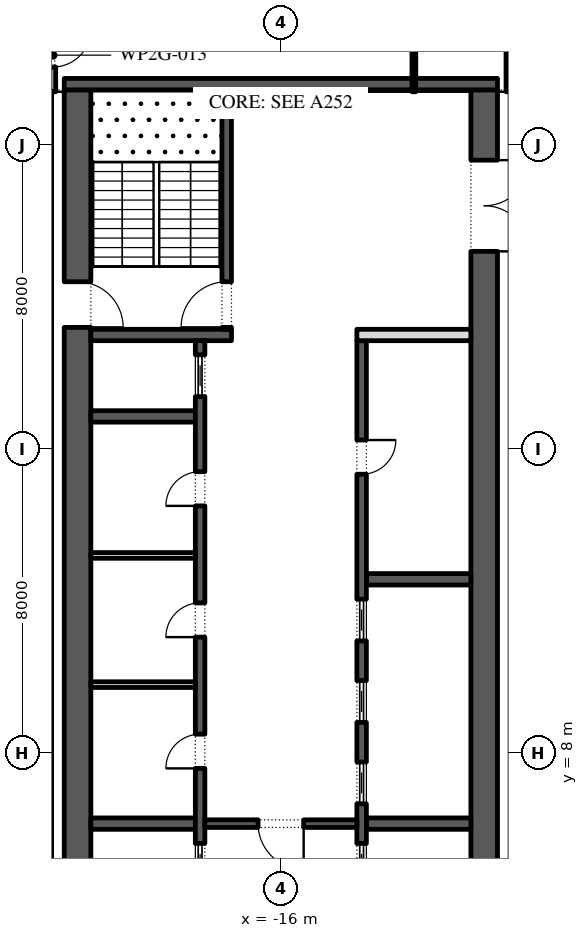
"""IFC4 building model, lengths in metres.
Left out: names, types, materials, properties, quantities, classifications, styles, units other than length and angle.
Written with IfcOpenShell. Run it as: python <this file> out.ifc"""

import sys

from ifc_helpers import new_model, si_unit, direction, frame, frame_2d, origin, place, context, subcontext, project, spatial, rectangle, extrude, element, fill, save


model = new_model("IFC4")
c1 = context("Model", 3, precision=1e-05, world=origin(), true_north=direction((0.0, 1.0)))
c2 = subcontext(c1, "Body", "Model", "MODEL_VIEW")
j1 = project(units=[si_unit("LENGTHUNIT", "METRE"), si_unit("PLANEANGLEUNIT", "RADIAN")], contexts=[c1])
p1 = place(None, origin())
s1 = spatial("IfcSite", under=j1, at=p1, CompositionType="ELEMENT")
p2 = place(p1, origin())
s2 = spatial("IfcBuilding", under=s1, at=p2, CompositionType="ELEMENT")
p3 = place(p2, frame((0.0, 0.0, 222.0)))
s3 = spatial("IfcBuildingStorey", under=s2, at=p3, CompositionType="ELEMENT", Elevation=222.0)
p4 = place(p3, frame((-33.157, 30.092, 0.0), z_axis=(0.0, 0.0, 1.0), x_axis=(0.224950279389, -0.974370243697, 0.0)))
e1 = element("IfcWall", 1, at=p4, inside=s3, PredefinedType="STANDARD", context=c2, shape_type="SweptSolid", body=[
    extrude(rectangle(XDim=49.5, YDim=0.3, at=frame_2d((24.75, 0.0))), origin(), (0.0, 0.0, 1.0), 3.75),
])
p5 = place(p4, frame((2.207, 0.0, 0.0)))
e2 = element("IfcOpeningElement", 2, at=p5, cuts=e1, PredefinedType="OPENING", context=c2, shape_type="SweptSolid", body=[
    extrude(rectangle(XDim=2.4, YDim=3.5, at=frame_2d((1.2, 1.75))), frame((0.0, 0.16, 0.0), z_axis=(0.0, -1.0, 0.0), x_axis=(1.0, 0.0, 0.0)), (0.0, 0.0, 1.0), 0.32),
])
p6 = place(p4, frame((7.871, 0.0, 0.45)))
e3 = element("IfcOpeningElement", 3, at=p6, cuts=e1, PredefinedType="OPENING", context=c2, shape_type="SweptSolid", body=[
    extrude(rectangle(XDim=5.0, YDim=2.575, at=frame_2d((2.5, 1.288))), frame((0.0, 0.16, 0.0), z_axis=(0.0, -1.0, 0.0), x_axis=(1.0, 0.0, 0.0)), (0.0, 0.0, 1.0), 0.32),
])
p7 = place(p4, frame((14.986, 0.0, 0.45)))
e4 = element("IfcOpeningElement", 4, at=p7, cuts=e1, PredefinedType="OPENING", context=c2, shape_type="SweptSolid", body=[
    extrude(rectangle(XDim=5.0, YDim=3.25, at=frame_2d((2.5, 1.625))), frame((0.0, 0.16, 0.0), z_axis=(0.0, -1.0, 0.0), x_axis=(1.0, 0.0, 0.0)), (0.0, 0.0, 1.0), 0.32),
])
p8 = place(p4, frame((22.1, 0.0, 0.45)))
e5 = element("IfcOpeningElement", 5, at=p8, cuts=e1, PredefinedType="OPENING", context=c2, shape_type="SweptSolid", body=[
    extrude(rectangle(XDim=5.0, YDim=2.75, at=frame_2d((2.5, 1.375))), frame((0.0, 0.16, 0.0), z_axis=(0.0, -1.0, 0.0), x_axis=(1.0, 0.0, 0.0)), (0.0, 0.0, 1.0), 0.32),
])
p9 = place(p4, frame((30.514, 0.0, 0.0)))
e6 = element("IfcOpeningElement", 6, at=p9, cuts=e1, PredefinedType="OPENING", context=c2, shape_type="SweptSolid", body=[
    extrude(rectangle(XDim=2.4, YDim=3.5, at=frame_2d((1.2, 1.75))), frame((0.0, 0.16, 0.0), z_axis=(0.0, -1.0, 0.0), x_axis=(1.0, 0.0, 0.0)), (0.0, 0.0, 1.0), 0.32),
])
p10 = place(p4, frame((36.329, 0.0, 0.45)))
e7 = element("IfcOpeningElement", 7, at=p10, cuts=e1, PredefinedType="OPENING", context=c2, shape_type="SweptSolid", body=[
    extrude(rectangle(XDim=5.0, YDim=3.25, at=frame_2d((2.5, 1.625))), frame((0.0, 0.16, 0.0), z_axis=(0.0, -1.0, 0.0), x_axis=(1.0, 0.0, 0.0)), (0.0, 0.0, 1.0), 0.32),
])
p11 = place(p4, frame((43.443, 0.0, 0.45)))
e8 = element("IfcOpeningElement", 8, at=p11, cuts=e1, PredefinedType="OPENING", context=c2, shape_type="SweptSolid", body=[
    extrude(rectangle(XDim=5.0, YDim=3.25, at=frame_2d((2.5, 1.625))), frame((0.0, 0.16, 0.0), z_axis=(0.0, -1.0, 0.0), x_axis=(1.0, 0.0, 0.0)), (0.0, 0.0, 1.0), 0.32),
])
p12 = place(p3, frame((-21.35, -2.45, 0.0), z_axis=(0.0, 0.0, 1.0), x_axis=(0.0, 1.0, 0.0)))
e9 = element("IfcWall", 9, at=p12, inside=s3, PredefinedType="SHEAR", context=c2, shape_type="SweptSolid", body=[
    extrude(rectangle(XDim=27.9, YDim=0.7, at=frame_2d((13.95, 0.0))), origin(), (0.0, 0.0, 1.0), 3.75),
])
p13 = place(p12, frame((5.05, 0.0, 0.0)))
e10 = element("IfcOpeningElement", 10, at=p13, cuts=e9, PredefinedType="OPENING", context=c2, shape_type="SweptSolid", body=[
    extrude(rectangle(XDim=1.2, YDim=2.1, at=frame_2d((0.6, 1.05))), frame((0.0, 0.36, 0.0), z_axis=(0.0, -1.0, 0.0), x_axis=(1.0, 0.0, 0.0)), (0.0, 0.0, 1.0), 0.72),
])
p14 = place(p12, frame((21.65, 0.0, 0.0)))
e11 = element("IfcOpeningElement", 11, at=p14, cuts=e9, PredefinedType="OPENING", context=c2, shape_type="SweptSolid", body=[
    extrude(rectangle(XDim=1.2, YDim=2.1, at=frame_2d((0.6, 1.05))), frame((0.0, 0.36, 0.0), z_axis=(0.0, -1.0, 0.0), x_axis=(1.0, 0.0, 0.0)), (0.0, 0.0, 1.0), 0.72),
])
p15 = place(p3, frame((-10.65, -2.45, 0.0), z_axis=(0.0, 0.0, 1.0), x_axis=(0.0, 1.0, 0.0)))
e12 = element("IfcWall", 12, at=p15, inside=s3, PredefinedType="SHEAR", context=c2, shape_type="SweptSolid", body=[
    extrude(rectangle(XDim=27.9, YDim=0.7, at=frame_2d((13.95, 0.0))), origin(), (0.0, 0.0, 1.0), 3.75),
])
p16 = place(p15, frame((23.65, 0.0, 0.0)))
e13 = element("IfcOpeningElement", 13, at=p16, cuts=e12, PredefinedType="OPENING", context=c2, shape_type="SweptSolid", body=[
    extrude(rectangle(XDim=2.4, YDim=2.1, at=frame_2d((1.2, 1.05))), frame((0.0, 0.36, 0.0), z_axis=(0.0, -1.0, 0.0), x_axis=(1.0, 0.0, 0.0)), (0.0, 0.0, 1.0), 0.72),
])
p17 = place(p15, frame((1.387, 0.0, 0.0)))
e14 = element("IfcOpeningElement", 14, at=p17, cuts=e12, PredefinedType="OPENING", context=c2, shape_type="SweptSolid", body=[
    extrude(rectangle(XDim=0.9, YDim=2.1, at=frame_2d((0.45, 1.05))), frame((0.0, 0.36, 0.0), z_axis=(0.0, -1.0, 0.0), x_axis=(1.0, 0.0, 0.0)), (0.0, 0.0, 1.0), 0.72),
])
p18 = place(p15, frame((4.562, 0.0, 0.0)))
e15 = element("IfcOpeningElement", 15, at=p18, cuts=e12, PredefinedType="OPENING", context=c2, shape_type="SweptSolid", body=[
    extrude(rectangle(XDim=1.0, YDim=2.1, at=frame_2d((0.5, 1.05))), frame((0.0, 0.36, 0.0), z_axis=(0.0, -1.0, 0.0), x_axis=(1.0, 0.0, 0.0)), (0.0, 0.0, 1.0), 0.72),
])
p19 = place(p3, frame((-21.7, 25.6, 0.0), z_axis=(0.0, 0.0, 1.0), x_axis=(1.0, 0.0, 0.0)))
e16 = element("IfcWall", 16, at=p19, inside=s3, PredefinedType="SHEAR", context=c2, shape_type="SweptSolid", body=[
    extrude(rectangle(XDim=11.4, YDim=0.3, at=frame_2d((5.7, 0.0))), origin(), (0.0, 0.0, 1.0), 3.75),
])
p20 = place(p3, frame((-21.0, 19.0, 0.0), z_axis=(0.0, 0.0, 1.0), x_axis=(1.0, 0.0, 0.0)))
e17 = element("IfcWall", 17, at=p20, inside=s3, PredefinedType="SHEAR", context=c2, shape_type="SweptSolid", body=[
    extrude(rectangle(XDim=3.7, YDim=0.3, at=frame_2d((1.85, 0.0))), origin(), (0.0, 0.0, 1.0), 3.75),
])
p21 = place(p3, frame((-17.425, 19.15, 0.0), z_axis=(0.0, 0.0, 1.0), x_axis=(0.0, 1.0, 0.0)))
e18 = element("IfcWall", 18, at=p21, inside=s3, PredefinedType="SHEAR", context=c2, shape_type="SweptSolid", body=[
    extrude(rectangle(XDim=6.3, YDim=0.25, at=frame_2d((3.15, 0.0))), origin(), (0.0, 0.0, 1.0), 3.75),
])
p22 = place(p21, frame((0.05, 0.0, 0.0)))
e19 = element("IfcOpeningElement", 19, at=p22, cuts=e18, PredefinedType="OPENING", context=c2, shape_type="SweptSolid", body=[
    extrude(rectangle(XDim=1.2, YDim=2.1, at=frame_2d((0.6, 1.05))), frame((0.0, 0.135, 0.0), z_axis=(0.0, -1.0, 0.0), x_axis=(1.0, 0.0, 0.0)), (0.0, 0.0, 1.0), 0.27),
])
for number, where, z_axis, x_axis in (
    (20, (-21.0, 6.143, 0.0), (0.0, 0.0, 1.0), (1.0, 0.0, 0.0)),
    (21, (-21.0, 16.857, 0.0), (0.0, 0.0, 1.0), (1.0, 0.0, 0.0)),
):
    element("IfcWall", number, at=place(p3, frame(where, z_axis=z_axis, x_axis=x_axis)), inside=s3, PredefinedType="SHEAR", context=c2, shape_type="SweptSolid", body=[
        extrude(rectangle(XDim=2.75, YDim=0.3, at=frame_2d((1.375, 0.0))), origin(), (0.0, 0.0, 1.0), 3.75),
    ])
p23 = place(p3, frame((-18.125, 4.15, 0.0), z_axis=(0.0, 0.0, 1.0), x_axis=(0.0, 1.0, 0.0)))
e22 = element("IfcWall", 22, at=p23, inside=s3, PredefinedType="SHEAR", context=c2, shape_type="SweptSolid", body=[
    extrude(rectangle(XDim=14.7, YDim=0.25, at=frame_2d((7.35, 0.0))), origin(), (0.0, 0.0, 1.0), 3.75),
])
p24 = place(p23, frame((3.446, 0.0, 0.0)))
e23 = element("IfcOpeningElement", 23, at=p24, cuts=e22, PredefinedType="OPENING", context=c2, shape_type="SweptSolid", body=[
    extrude(rectangle(XDim=0.9, YDim=2.1, at=frame_2d((0.45, 1.05))), frame((0.0, 0.135, 0.0), z_axis=(0.0, -1.0, 0.0), x_axis=(1.0, 0.0, 0.0)), (0.0, 0.0, 1.0), 0.27),
])
p25 = place(p23, frame((6.9, 0.0, 0.0)))
e24 = element("IfcOpeningElement", 24, at=p25, cuts=e22, PredefinedType="OPENING", context=c2, shape_type="SweptSolid", body=[
    extrude(rectangle(XDim=0.9, YDim=2.1, at=frame_2d((0.45, 1.05))), frame((0.0, 0.135, 0.0), z_axis=(0.0, -1.0, 0.0), x_axis=(1.0, 0.0, 0.0)), (0.0, 0.0, 1.0), 0.27),
])
p26 = place(p23, frame((10.354, 0.0, 0.0)))
e25 = element("IfcOpeningElement", 25, at=p26, cuts=e22, PredefinedType="OPENING", context=c2, shape_type="SweptSolid", body=[
    extrude(rectangle(XDim=0.9, YDim=2.1, at=frame_2d((0.45, 1.05))), frame((0.0, 0.135, 0.0), z_axis=(0.0, -1.0, 0.0), x_axis=(1.0, 0.0, 0.0)), (0.0, 0.0, 1.0), 0.27),
])
p27 = place(p23, frame((0.371, 0.0, 0.0)))
e26 = element("IfcOpeningElement", 26, at=p27, cuts=e22, PredefinedType="OPENING", context=c2, shape_type="SweptSolid", body=[
    extrude(rectangle(XDim=1.1, YDim=2.1, at=frame_2d((0.55, 1.05))), frame((0.0, 0.135, 0.0), z_axis=(0.0, -1.0, 0.0), x_axis=(1.0, 0.0, 0.0)), (0.0, 0.0, 1.0), 0.27),
])
p28 = place(p23, frame((13.229, 0.0, 0.0)))
e27 = element("IfcOpeningElement", 27, at=p28, cuts=e22, PredefinedType="OPENING", context=c2, shape_type="SweptSolid", body=[
    extrude(rectangle(XDim=1.1, YDim=2.1, at=frame_2d((0.55, 1.05))), frame((0.0, 0.135, 0.0), z_axis=(0.0, -1.0, 0.0), x_axis=(1.0, 0.0, 0.0)), (0.0, 0.0, 1.0), 0.27),
])
for number, where, z_axis, x_axis in (
    (28, (-21.0, 9.8, 0.0), (0.0, 0.0, 1.0), (1.0, 0.0, 0.0)),
    (29, (-21.0, 13.2, 0.0), (0.0, 0.0, 1.0), (1.0, 0.0, 0.0)),
):
    element("IfcWall", number, at=place(p3, frame(where, z_axis=z_axis, x_axis=x_axis)), inside=s3, PredefinedType="PARTITIONING", context=c2, shape_type="SweptSolid", body=[
        extrude(rectangle(XDim=2.75, YDim=0.15, at=frame_2d((1.375, 0.0))), origin(), (0.0, 0.0, 1.0), 3.75),
    ])
for number, where, z_axis, x_axis in (
    (30, (-13.75, 6.143, 0.0), (0.0, 0.0, 1.0), (1.0, 0.0, 0.0)),
    (31, (-13.75, 12.571, 0.0), (0.0, 0.0, 1.0), (1.0, 0.0, 0.0)),
):
    element("IfcWall", number, at=place(p3, frame(where, z_axis=z_axis, x_axis=x_axis)), inside=s3, PredefinedType="SHEAR", context=c2, shape_type="SweptSolid", body=[
        extrude(rectangle(XDim=2.75, YDim=0.3, at=frame_2d((1.375, 0.0))), origin(), (0.0, 0.0, 1.0), 3.75),
    ])
p29 = place(p3, frame((-13.875, -2.45, 0.0), z_axis=(0.0, 0.0, 1.0), x_axis=(0.0, 1.0, 0.0)))
e32 = element("IfcWall", 32, at=p29, inside=s3, PredefinedType="SHEAR", context=c2, shape_type="SweptSolid", body=[
    extrude(rectangle(XDim=21.3, YDim=0.25, at=frame_2d((10.65, 0.0))), origin(), (0.0, 0.0, 1.0), 3.75),
])
p30 = place(p29, frame((17.786, 0.0, 0.0)))
e33 = element("IfcOpeningElement", 33, at=p30, cuts=e32, PredefinedType="OPENING", context=c2, shape_type="SweptSolid", body=[
    extrude(rectangle(XDim=0.9, YDim=2.1, at=frame_2d((0.45, 1.05))), frame((0.0, 0.135, 0.0), z_axis=(0.0, -1.0, 0.0), x_axis=(1.0, 0.0, 0.0)), (0.0, 0.0, 1.0), 0.27),
])
p31 = place(p29, frame((6.971, 0.0, 0.0)))
e34 = element("IfcOpeningElement", 34, at=p31, cuts=e32, PredefinedType="OPENING", context=c2, shape_type="SweptSolid", body=[
    extrude(rectangle(XDim=1.1, YDim=2.1, at=frame_2d((0.55, 1.05))), frame((0.0, 0.135, 0.0), z_axis=(0.0, -1.0, 0.0), x_axis=(1.0, 0.0, 0.0)), (0.0, 0.0, 1.0), 0.27),
])
p32 = place(p29, frame((9.114, 0.0, 0.0)))
e35 = element("IfcOpeningElement", 35, at=p32, cuts=e32, PredefinedType="OPENING", context=c2, shape_type="SweptSolid", body=[
    extrude(rectangle(XDim=1.1, YDim=2.1, at=frame_2d((0.55, 1.05))), frame((0.0, 0.135, 0.0), z_axis=(0.0, -1.0, 0.0), x_axis=(1.0, 0.0, 0.0)), (0.0, 0.0, 1.0), 0.27),
])
p33 = place(p29, frame((11.257, 0.0, 0.0)))
e36 = element("IfcOpeningElement", 36, at=p33, cuts=e32, PredefinedType="OPENING", context=c2, shape_type="SweptSolid", body=[
    extrude(rectangle(XDim=1.1, YDim=2.1, at=frame_2d((0.55, 1.05))), frame((0.0, 0.135, 0.0), z_axis=(0.0, -1.0, 0.0), x_axis=(1.0, 0.0, 0.0)), (0.0, 0.0, 1.0), 0.27),
])
p34 = place(p29, frame((13.4, 0.0, 0.0)))
e37 = element("IfcOpeningElement", 37, at=p34, cuts=e32, PredefinedType="OPENING", context=c2, shape_type="SweptSolid", body=[
    extrude(rectangle(XDim=1.1, YDim=2.1, at=frame_2d((0.55, 1.05))), frame((0.0, 0.135, 0.0), z_axis=(0.0, -1.0, 0.0), x_axis=(1.0, 0.0, 0.0)), (0.0, 0.0, 1.0), 0.27),
])
p35 = place(p3, frame((-14.0, 19.0, 0.0), z_axis=(0.0, 0.0, 1.0), x_axis=(1.0, 0.0, 0.0)))
e38 = element("IfcWall", 38, at=p35, inside=s3, PredefinedType="PARTITIONING", context=c2, shape_type="SweptSolid", body=[
    extrude(rectangle(XDim=3.0, YDim=0.3, at=frame_2d((1.5, 0.0))), origin(), (0.0, 0.0, 1.0), 3.75),
])
p36 = place(p3, frame((-18.0, 6.143, 0.0), z_axis=(0.0, 0.0, 1.0), x_axis=(1.0, 0.0, 0.0)))
e39 = element("IfcWall", 39, at=p36, inside=s3, PredefinedType="SHEAR", context=c2, shape_type="SweptSolid", body=[
    extrude(rectangle(XDim=4.0, YDim=0.2, at=frame_2d((2.0, 0.0))), origin(), (0.0, 0.0, 1.0), 3.75),
])
p37 = place(p36, frame((1.4, 0.0, 0.0)))
e40 = element("IfcOpeningElement", 40, at=p37, cuts=e39, PredefinedType="OPENING", context=c2, shape_type="SweptSolid", body=[
    extrude(rectangle(XDim=1.2, YDim=2.1, at=frame_2d((0.6, 1.05))), frame((0.0, 0.11, 0.0), z_axis=(0.0, -1.0, 0.0), x_axis=(1.0, 0.0, 0.0)), (0.0, 0.0, 1.0), 0.22),
])
p38 = place(p3, frame((-22.0, 27.325, 0.0), z_axis=(0.0, 0.0, 1.0), x_axis=(0.0, -1.0, 0.0)))
e41 = element("IfcWall", 41, at=p38, inside=s3, PredefinedType="PARTITIONING", context=c2, shape_type="SweptSolid", body=[
    extrude(rectangle(XDim=1.925, YDim=0.15, at=frame_2d((0.962, 0.0))), origin(), (0.0, 0.0, 1.0), 3.75),
])
p39 = place(p38, frame((0.275, 0.0, 0.0)))
e42 = element("IfcOpeningElement", 42, at=p39, cuts=e41, PredefinedType="OPENING", context=c2, shape_type="SweptSolid", body=[
    extrude(rectangle(XDim=1.0, YDim=2.1, at=frame_2d((0.5, 1.05))), frame((0.0, 0.085, 0.0), z_axis=(0.0, -1.0, 0.0), x_axis=(1.0, 0.0, 0.0)), (0.0, 0.0, 1.0), 0.17),
])
p40 = place(p3, frame((-12.5, 25.4, 0.0), z_axis=(0.0, 0.0, 1.0), x_axis=(0.0, 1.0, 0.0)))
e43 = element("IfcWall", 43, at=p40, inside=s3, PredefinedType="PARTITIONING", context=c2, shape_type="SweptSolid", body=[
    extrude(rectangle(XDim=5.07, YDim=0.1, at=frame_2d((2.535, 0.0))), origin(), (0.0, 0.0, 1.0), 3.75),
])
p41 = place(p3, frame((-10.0, 25.4, 0.0), z_axis=(0.0, 0.0, 1.0), x_axis=(0.0, 1.0, 0.0)))
e44 = element("IfcWall", 44, at=p41, inside=s3, PredefinedType="PARTITIONING", context=c2, shape_type="SweptSolid", body=[
    extrude(rectangle(XDim=2.075, YDim=0.15, at=frame_2d((1.038, 0.0))), origin(), (0.0, 0.0, 1.0), 3.75),
])
p42 = place(p24, origin())
e45 = element("IfcDoor", 45, at=p42, inside=s3, OperationType="SINGLE_SWING_RIGHT", PredefinedType="DOOR", context=c2, shape_type="SweptSolid", body=[
    extrude(rectangle(XDim=0.9, YDim=2.1, at=frame_2d((0.45, 1.05))), frame((0.0, 0.125, 0.0), z_axis=(0.0, -1.0, 0.0), x_axis=(1.0, 0.0, 0.0)), (0.0, 0.0, 1.0), 0.05),
])
fill(e23, e45)
p43 = place(p25, origin())
e46 = element("IfcDoor", 46, at=p43, inside=s3, OperationType="SINGLE_SWING_RIGHT", PredefinedType="DOOR", context=c2, shape_type="SweptSolid", body=[
    extrude(rectangle(XDim=0.9, YDim=2.1, at=frame_2d((0.45, 1.05))), frame((0.0, 0.125, 0.0), z_axis=(0.0, -1.0, 0.0), x_axis=(1.0, 0.0, 0.0)), (0.0, 0.0, 1.0), 0.05),
])
fill(e24, e46)
p44 = place(p26, origin())
e47 = element("IfcDoor", 47, at=p44, inside=s3, OperationType="SINGLE_SWING_RIGHT", PredefinedType="DOOR", context=c2, shape_type="SweptSolid", body=[
    extrude(rectangle(XDim=0.9, YDim=2.1, at=frame_2d((0.45, 1.05))), frame((0.0, 0.125, 0.0), z_axis=(0.0, -1.0, 0.0), x_axis=(1.0, 0.0, 0.0)), (0.0, 0.0, 1.0), 0.05),
])
fill(e25, e47)
p45 = place(p27, origin())
e48 = element("IfcDoor", 48, at=p45, inside=s3, OperationType="SLIDING_TO_LEFT", PredefinedType="DOOR", context=c2, shape_type="SweptSolid", body=[
    extrude(rectangle(XDim=1.1, YDim=2.1, at=frame_2d((0.55, 1.05))), frame((0.0, 0.025, 0.0), z_axis=(0.0, -1.0, 0.0), x_axis=(1.0, 0.0, 0.0)), (0.0, 0.0, 1.0), 0.05),
])
fill(e26, e48)
p46 = place(p28, origin())
e49 = element("IfcDoor", 49, at=p46, inside=s3, OperationType="SLIDING_TO_LEFT", PredefinedType="DOOR", context=c2, shape_type="SweptSolid", body=[
    extrude(rectangle(XDim=1.1, YDim=2.1, at=frame_2d((0.55, 1.05))), frame((0.0, 0.025, 0.0), z_axis=(0.0, -1.0, 0.0), x_axis=(1.0, 0.0, 0.0)), (0.0, 0.0, 1.0), 0.05),
])
fill(e27, e49)
p47 = place(p30, frame((0.9, -0.2, 0.0), z_axis=(0.0, 0.0, 1.0), x_axis=(-1.0, 0.0, 0.0)))
e50 = element("IfcDoor", 50, at=p47, inside=s3, OperationType="SINGLE_SWING_RIGHT", PredefinedType="DOOR", context=c2, shape_type="SweptSolid", body=[
    extrude(rectangle(XDim=0.9, YDim=2.1, at=frame_2d((0.45, 1.05))), frame((0.0, -0.075, 0.0), z_axis=(0.0, -1.0, 0.0), x_axis=(1.0, 0.0, 0.0)), (0.0, 0.0, 1.0), 0.05),
])
fill(e33, e50)
p48 = place(p31, origin())
e51 = element("IfcDoor", 51, at=p48, inside=s3, OperationType="SLIDING_TO_LEFT", PredefinedType="DOOR", context=c2, shape_type="SweptSolid", body=[
    extrude(rectangle(XDim=1.1, YDim=2.1, at=frame_2d((0.55, 1.05))), frame((0.0, 0.025, 0.0), z_axis=(0.0, -1.0, 0.0), x_axis=(1.0, 0.0, 0.0)), (0.0, 0.0, 1.0), 0.05),
])
fill(e34, e51)
p49 = place(p32, origin())
e52 = element("IfcDoor", 52, at=p49, inside=s3, OperationType="SLIDING_TO_LEFT", PredefinedType="DOOR", context=c2, shape_type="SweptSolid", body=[
    extrude(rectangle(XDim=1.1, YDim=2.1, at=frame_2d((0.55, 1.05))), frame((0.0, 0.025, 0.0), z_axis=(0.0, -1.0, 0.0), x_axis=(1.0, 0.0, 0.0)), (0.0, 0.0, 1.0), 0.05),
])
fill(e35, e52)
p50 = place(p33, origin())
e53 = element("IfcDoor", 53, at=p50, inside=s3, OperationType="SLIDING_TO_LEFT", PredefinedType="DOOR", context=c2, shape_type="SweptSolid", body=[
    extrude(rectangle(XDim=1.1, YDim=2.1, at=frame_2d((0.55, 1.05))), frame((0.0, 0.025, 0.0), z_axis=(0.0, -1.0, 0.0), x_axis=(1.0, 0.0, 0.0)), (0.0, 0.0, 1.0), 0.05),
])
fill(e36, e53)
p51 = place(p34, origin())
e54 = element("IfcDoor", 54, at=p51, inside=s3, OperationType="SLIDING_TO_LEFT", PredefinedType="DOOR", context=c2, shape_type="SweptSolid", body=[
    extrude(rectangle(XDim=1.1, YDim=2.1, at=frame_2d((0.55, 1.05))), frame((0.0, 0.025, 0.0), z_axis=(0.0, -1.0, 0.0), x_axis=(1.0, 0.0, 0.0)), (0.0, 0.0, 1.0), 0.05),
])
fill(e37, e54)
p52 = place(p37, frame((1.2, 0.0, 0.0), z_axis=(0.0, 0.0, 1.0), x_axis=(-1.0, 0.0, 0.0)))
e55 = element("IfcDoor", 55, at=p52, inside=s3, OperationType="SINGLE_SWING_RIGHT", PredefinedType="DOOR", context=c2, shape_type="SweptSolid", body=[
    extrude(rectangle(XDim=1.2, YDim=2.1, at=frame_2d((0.6, 1.05))), frame((0.0, 0.025, 0.0), z_axis=(0.0, -1.0, 0.0), x_axis=(1.0, 0.0, 0.0)), (0.0, 0.0, 1.0), 0.05),
])
fill(e40, e55)
p53 = place(p16, frame((2.4, 0.0, 0.0), z_axis=(0.0, 0.0, 1.0), x_axis=(-1.0, 0.0, 0.0)))
e56 = element("IfcDoor", 56, at=p53, inside=s3, OperationType="DOUBLE_DOOR_SINGLE_SWING", PredefinedType="DOOR", context=c2, shape_type="SweptSolid", body=[
    extrude(rectangle(XDim=2.4, YDim=2.1, at=frame_2d((1.2, 1.05))), frame((0.0, 0.025, 0.0), z_axis=(0.0, -1.0, 0.0), x_axis=(1.0, 0.0, 0.0)), (0.0, 0.0, 1.0), 0.05),
])
fill(e13, e56)
p54 = place(p22, origin())
e57 = element("IfcDoor", 57, at=p54, inside=s3, OperationType="SINGLE_SWING_RIGHT", PredefinedType="DOOR", context=c2, shape_type="SweptSolid", body=[
    extrude(rectangle(XDim=1.2, YDim=2.1, at=frame_2d((0.6, 1.05))), frame((0.0, 0.025, 0.0), z_axis=(0.0, -1.0, 0.0), x_axis=(1.0, 0.0, 0.0)), (0.0, 0.0, 1.0), 0.05),
])
fill(e19, e57)
p55 = place(p14, frame((1.2, 0.0, 0.0), z_axis=(0.0, 0.0, 1.0), x_axis=(-1.0, 0.0, 0.0)))
e58 = element("IfcDoor", 58, at=p55, inside=s3, OperationType="SINGLE_SWING_LEFT", PredefinedType="DOOR", context=c2, shape_type="SweptSolid", body=[
    extrude(rectangle(XDim=1.2, YDim=2.1, at=frame_2d((0.6, 1.05))), frame((0.0, 0.025, 0.0), z_axis=(0.0, -1.0, 0.0), x_axis=(1.0, 0.0, 0.0)), (0.0, 0.0, 1.0), 0.05),
])
fill(e11, e58)
p56 = place(p39, origin())
e59 = element("IfcDoor", 59, at=p56, inside=s3, OperationType="SINGLE_SWING_RIGHT", PredefinedType="DOOR", context=c2, shape_type="SweptSolid", body=[
    extrude(rectangle(XDim=1.0, YDim=2.1, at=frame_2d((0.5, 1.05))), frame((0.0, 0.025, 0.0), z_axis=(0.0, -1.0, 0.0), x_axis=(1.0, 0.0, 0.0)), (0.0, 0.0, 1.0), 0.05),
])
fill(e42, e59)
save(model, sys.argv[1])
